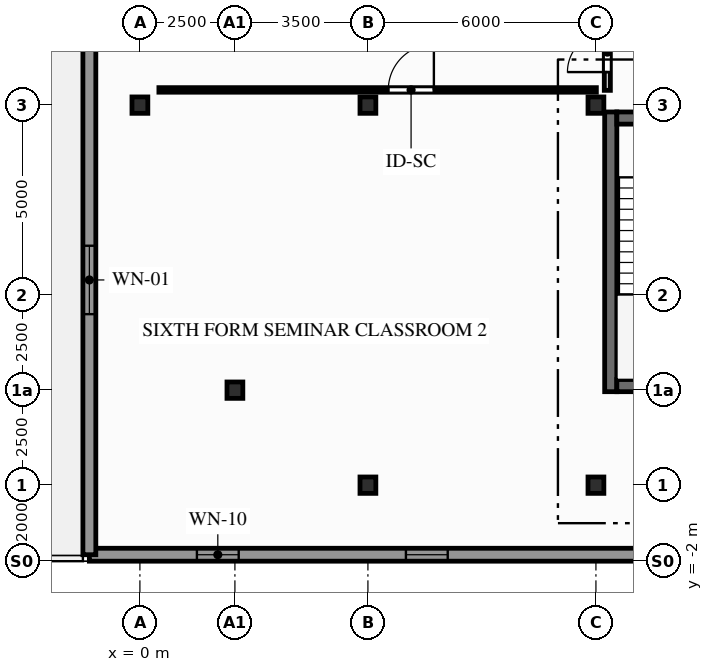
"""IFC4 building model, lengths in metres.
Left out: names, types, materials, properties, quantities, classifications, styles, units other than length and angle.
Written with IfcOpenShell. Run it as: python <this file> out.ifc"""

import sys

from ifc_helpers import new_model, si_unit, direction, frame, frame_2d, origin, origin_2d, place, context, subcontext, project, spatial, rectangle, i_section, extrude, element, fill, save


model = new_model("IFC4")
c1 = context("Model", 3, precision=1e-05, world=origin(), true_north=direction((0.0, 1.0)))
c2 = subcontext(c1, "Body", "Model", "MODEL_VIEW")
j1 = project(units=[si_unit("LENGTHUNIT", "METRE"), si_unit("PLANEANGLEUNIT", "RADIAN")], contexts=[c1])
p1 = place(None, origin())
s1 = spatial("IfcSite", under=j1, at=p1, CompositionType="ELEMENT")
p2 = place(p1, origin())
s2 = spatial("IfcBuilding", under=s1, at=p2, CompositionType="ELEMENT")
p3 = place(p2, frame((0.0, 0.0, 18.0)))
s3 = spatial("IfcBuildingStorey", under=s2, at=p3, CompositionType="ELEMENT", Elevation=18.0)
for number, where, z_axis, x_axis in (
    (1, (0.0, 10.0, 0.0), (0.0, 0.0, 1.0), (1.0, 0.0, 0.0)),
    (2, (2.5, 2.5, 0.0), (0.0, 0.0, 1.0), (1.0, 0.0, 0.0)),
    (3, (6.0, 0.0, 0.0), (0.0, 0.0, 1.0), (1.0, 0.0, 0.0)),
    (4, (6.0, 10.0, 0.0), (0.0, 0.0, 1.0), (1.0, 0.0, 0.0)),
    (5, (12.0, 0.0, 0.0), (0.0, 0.0, 1.0), (1.0, 0.0, 0.0)),
    (6, (12.0, 10.0, 0.0), (0.0, 0.0, 1.0), (1.0, 0.0, 0.0)),
):
    element("IfcColumn", number, at=place(p3, frame(where, z_axis=z_axis, x_axis=x_axis)), inside=s3, PredefinedType="COLUMN", context=c2, shape_type="SweptSolid", body=[
        extrude(i_section(OverallWidth=0.417, OverallDepth=0.431, WebThickness=0.065, FlangeThickness=0.106, FilletRadius=0.015, at=origin_2d()), origin(), (0.0, 0.0, 1.0), 4.5),
    ])
p4 = place(p3, frame((-1.33, -1.83, 0.0), z_axis=(0.0, 0.0, 1.0), x_axis=(1.0, 0.0, 0.0)))
e7 = element("IfcWall", 7, at=p4, inside=s3, PredefinedType="STANDARD", context=c2, shape_type="SweptSolid", body=[
    extrude(rectangle(XDim=62.66, YDim=0.34, at=frame_2d((31.33, 0.0))), origin(), (0.0, 0.0, 1.0), 4.22),
])
p5 = place(p4, frame((2.83, 0.0, 1.2)))
e8 = element("IfcOpeningElement", 8, at=p5, cuts=e7, PredefinedType="OPENING", context=c2, shape_type="SweptSolid", body=[
    extrude(rectangle(XDim=1.1, YDim=1.1, at=frame_2d((0.55, 0.55))), frame((0.0, 0.18, 0.0), z_axis=(0.0, -1.0, 0.0), x_axis=(1.0, 0.0, 0.0)), (0.0, 0.0, 1.0), 0.36),
])
p6 = place(p4, frame((8.33, 0.0, 1.2)))
e9 = element("IfcOpeningElement", 9, at=p6, cuts=e7, PredefinedType="OPENING", context=c2, shape_type="SweptSolid", body=[
    extrude(rectangle(XDim=1.1, YDim=1.1, at=frame_2d((0.55, 0.55))), frame((0.0, 0.18, 0.0), z_axis=(0.0, -1.0, 0.0), x_axis=(1.0, 0.0, 0.0)), (0.0, 0.0, 1.0), 0.36),
])
p7 = place(p4, frame((52.33, 0.0, 1.2)))
e10 = element("IfcOpeningElement", 10, at=p7, cuts=e7, PredefinedType="OPENING", context=c2, shape_type="SweptSolid", body=[
    extrude(rectangle(XDim=1.1, YDim=1.1, at=frame_2d((0.55, 0.55))), frame((0.0, 0.18, 0.0), z_axis=(0.0, -1.0, 0.0), x_axis=(1.0, 0.0, 0.0)), (0.0, 0.0, 1.0), 0.36),
])
p8 = place(p4, frame((57.83, 0.0, 1.2)))
e11 = element("IfcOpeningElement", 11, at=p8, cuts=e7, PredefinedType="OPENING", context=c2, shape_type="SweptSolid", body=[
    extrude(rectangle(XDim=1.1, YDim=1.1, at=frame_2d((0.55, 0.55))), frame((0.0, 0.18, 0.0), z_axis=(0.0, -1.0, 0.0), x_axis=(1.0, 0.0, 0.0)), (0.0, 0.0, 1.0), 0.36),
])
p9 = place(p3, frame((-1.33, 34.6, 0.0), z_axis=(0.0, 0.0, 1.0), x_axis=(0.0, -1.0, 0.0)))
e12 = element("IfcWall", 12, at=p9, inside=s3, PredefinedType="STANDARD", context=c2, shape_type="SweptSolid", body=[
    extrude(rectangle(XDim=36.43, YDim=0.34, at=frame_2d((18.215, 0.0))), origin(), (0.0, 0.0, 1.0), 4.22),
])
p10 = place(p9, frame((28.3, 0.0, 0.9)))
e13 = element("IfcOpeningElement", 13, at=p10, cuts=e12, PredefinedType="OPENING", context=c2, shape_type="SweptSolid", body=[
    extrude(rectangle(XDim=1.8, YDim=1.95, at=frame_2d((0.9, 0.975))), frame((0.0, 0.18, 0.0), z_axis=(0.0, -1.0, 0.0), x_axis=(1.0, 0.0, 0.0)), (0.0, 0.0, 1.0), 0.36),
])
p11 = place(p9, frame((19.3, 0.0, 0.9)))
e14 = element("IfcOpeningElement", 14, at=p11, cuts=e12, PredefinedType="OPENING", context=c2, shape_type="SweptSolid", body=[
    extrude(rectangle(XDim=1.8, YDim=1.95, at=frame_2d((0.9, 0.975))), frame((0.0, 0.18, 0.0), z_axis=(0.0, -1.0, 0.0), x_axis=(1.0, 0.0, 0.0)), (0.0, 0.0, 1.0), 0.36),
])
p12 = place(p9, frame((6.0, 0.0, 0.9)))
e15 = element("IfcOpeningElement", 15, at=p12, cuts=e12, PredefinedType="OPENING", context=c2, shape_type="SweptSolid", body=[
    extrude(rectangle(XDim=1.8, YDim=1.95, at=frame_2d((0.9, 0.975))), frame((0.0, 0.18, 0.0), z_axis=(0.0, -1.0, 0.0), x_axis=(1.0, 0.0, 0.0)), (0.0, 0.0, 1.0), 0.36),
])
p13 = place(p9, frame((14.4, 0.0, 0.0)))
e16 = element("IfcOpeningElement", 16, at=p13, cuts=e12, PredefinedType="OPENING", context=c2, shape_type="SweptSolid", body=[
    extrude(rectangle(XDim=1.7, YDim=2.3, at=frame_2d((0.85, 1.15))), frame((0.0, 0.18, 0.0), z_axis=(0.0, -1.0, 0.0), x_axis=(1.0, 0.0, 0.0)), (0.0, 0.0, 1.0), 0.36),
])
p14 = place(p3, frame((12.39, 2.46, 0.0), z_axis=(0.0, 0.0, 1.0), x_axis=(0.0, 1.0, 0.0)))
e17 = element("IfcWall", 17, at=p14, inside=s3, PredefinedType="SHEAR", context=c2, shape_type="SweptSolid", body=[
    extrude(rectangle(XDim=7.36, YDim=0.32, at=frame_2d((3.68, 0.0))), origin(), (0.0, 0.0, 1.0), 4.22),
])
p15 = place(p3, frame((12.55, 2.62, 0.0), z_axis=(0.0, 0.0, 1.0), x_axis=(1.0, 0.0, 0.0)))
e18 = element("IfcWall", 18, at=p15, inside=s3, PredefinedType="SHEAR", context=c2, shape_type="SweptSolid", body=[
    extrude(rectangle(XDim=2.95, YDim=0.32, at=frame_2d((1.475, 0.0))), origin(), (0.0, 0.0, 1.0), 4.22),
])
p16 = place(p3, frame((15.5, 9.66, 0.0), z_axis=(0.0, 0.0, 1.0), x_axis=(-1.0, 0.0, 0.0)))
e19 = element("IfcWall", 19, at=p16, inside=s3, PredefinedType="SHEAR", context=c2, shape_type="SweptSolid", body=[
    extrude(rectangle(XDim=2.95, YDim=0.32, at=frame_2d((1.475, 0.0))), origin(), (0.0, 0.0, 1.0), 4.22),
])
p17 = place(p16, frame((0.95, 0.0, 0.0)))
e20 = element("IfcOpeningElement", 20, at=p17, cuts=e19, PredefinedType="OPENING", context=c2, shape_type="SweptSolid", body=[
    extrude(rectangle(XDim=1.05, YDim=2.06, at=frame_2d((0.525, 1.03))), frame((0.0, 0.17, 0.0), z_axis=(0.0, -1.0, 0.0), x_axis=(1.0, 0.0, 0.0)), (0.0, 0.0, 1.0), 0.34),
])
p18 = place(p3, frame((12.3, 10.389, 0.0), z_axis=(0.0, 0.0, 1.0), x_axis=(0.0, 1.0, 0.0)))
e21 = element("IfcWall", 21, at=p18, inside=s3, PredefinedType="PARTITIONING", context=c2, shape_type="SweptSolid", body=[
    extrude(rectangle(XDim=2.011, YDim=0.16, at=frame_2d((1.006, 0.0))), origin(), (0.0, 0.0, 1.0), 4.22),
])
p19 = place(p18, frame((0.481, 0.0, 0.0)))
e22 = element("IfcOpeningElement", 22, at=p19, cuts=e21, PredefinedType="OPENING", context=c2, shape_type="SweptSolid", body=[
    extrude(rectangle(XDim=1.05, YDim=2.06, at=frame_2d((0.525, 1.03))), frame((0.0, 0.09, 0.0), z_axis=(0.0, -1.0, 0.0), x_axis=(1.0, 0.0, 0.0)), (0.0, 0.0, 1.0), 0.18),
])
p20 = place(p3, frame((0.5, 10.4, 0.0), z_axis=(0.0, 0.0, 1.0), x_axis=(1.0, 0.0, 0.0)))
e23 = element("IfcWall", 23, at=p20, inside=s3, PredefinedType="PARTITIONING", context=c2, shape_type="SweptSolid", body=[
    extrude(rectangle(XDim=11.511, YDim=0.12, at=frame_2d((5.756, 0.0))), origin(), (0.0, 0.0, 1.0), 3.344),
])
p21 = place(p20, frame((6.036, 0.0, 0.0)))
e24 = element("IfcOpeningElement", 24, at=p21, cuts=e23, PredefinedType="OPENING", context=c2, shape_type="SweptSolid", body=[
    extrude(rectangle(XDim=1.2, YDim=2.08, at=frame_2d((0.6, 1.04))), frame((0.0, 0.07, 0.0), z_axis=(0.0, -1.0, 0.0), x_axis=(1.0, 0.0, 0.0)), (0.0, 0.0, 1.0), 0.14),
])
p22 = place(p5, origin())
e25 = element("IfcWindow", 25, at=p22, inside=s3, PartitioningType="SINGLE_PANEL", PredefinedType="WINDOW", context=c2, shape_type="SweptSolid", body=[
    extrude(rectangle(XDim=1.1, YDim=1.1, at=frame_2d((0.55, 0.55))), frame((0.0, 0.03, 0.0), z_axis=(0.0, -1.0, 0.0), x_axis=(1.0, 0.0, 0.0)), (0.0, 0.0, 1.0), 0.06),
])
fill(e8, e25)
p23 = place(p6, origin())
e26 = element("IfcWindow", 26, at=p23, inside=s3, PartitioningType="SINGLE_PANEL", PredefinedType="WINDOW", context=c2, shape_type="SweptSolid", body=[
    extrude(rectangle(XDim=1.1, YDim=1.1, at=frame_2d((0.55, 0.55))), frame((0.0, 0.03, 0.0), z_axis=(0.0, -1.0, 0.0), x_axis=(1.0, 0.0, 0.0)), (0.0, 0.0, 1.0), 0.06),
])
fill(e9, e26)
p24 = place(p10, origin())
e27 = element("IfcWindow", 27, at=p24, inside=s3, PartitioningType="SINGLE_PANEL", PredefinedType="WINDOW", context=c2, shape_type="SweptSolid", body=[
    extrude(rectangle(XDim=1.8, YDim=1.95, at=frame_2d((0.9, 0.975))), frame((0.0, 0.03, 0.0), z_axis=(0.0, -1.0, 0.0), x_axis=(1.0, 0.0, 0.0)), (0.0, 0.0, 1.0), 0.06),
])
fill(e13, e27)
p25 = place(p19, origin())
e28 = element("IfcDoor", 28, at=p25, inside=s3, OperationType="SINGLE_SWING_LEFT", PredefinedType="DOOR", context=c2, shape_type="SweptSolid", body=[
    extrude(rectangle(XDim=1.05, YDim=2.06, at=frame_2d((0.525, 1.03))), frame((0.0, 0.025, 0.0), z_axis=(0.0, -1.0, 0.0), x_axis=(1.0, 0.0, 0.0)), (0.0, 0.0, 1.0), 0.05),
])
fill(e22, e28)
p26 = place(p21, origin())
e29 = element("IfcDoor", 29, at=p26, inside=s3, OperationType="SINGLE_SWING_RIGHT", PredefinedType="DOOR", context=c2, shape_type="SweptSolid", body=[
    extrude(rectangle(XDim=1.2, YDim=2.08, at=frame_2d((0.6, 1.04))), frame((0.0, 0.025, 0.0), z_axis=(0.0, -1.0, 0.0), x_axis=(1.0, 0.0, 0.0)), (0.0, 0.0, 1.0), 0.05),
])
fill(e24, e29)
save(model, sys.argv[1])
